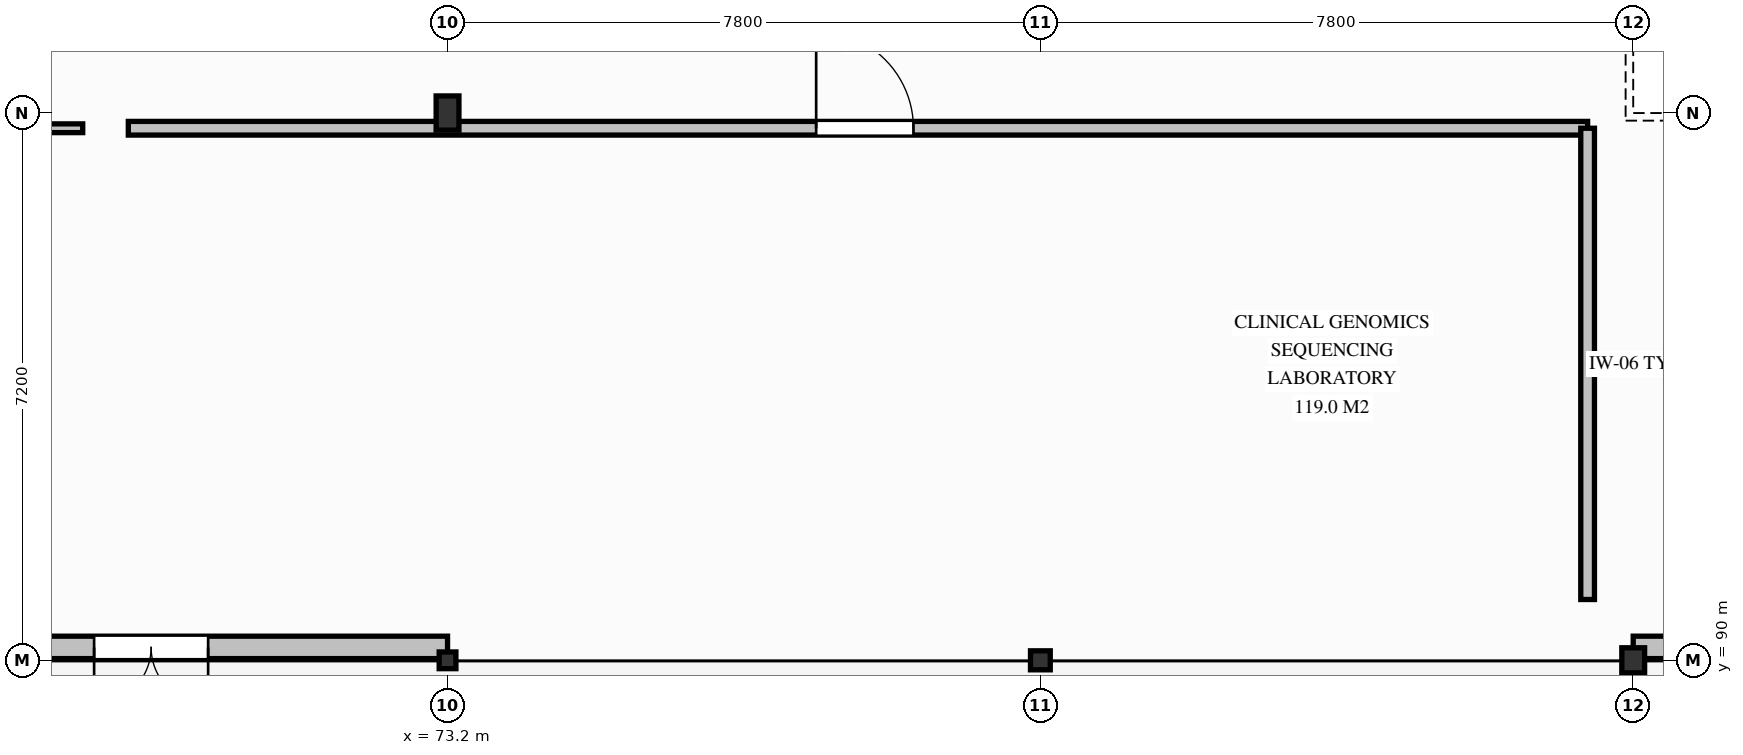
"""IFC4 building model, lengths in metres.
Left out: names, types, materials, properties, quantities, classifications, styles, units other than length and angle.
Written with IfcOpenShell. Run it as: python <this file> out.ifc"""

import sys

from ifc_helpers import new_model, si_unit, direction, frame, frame_2d, origin, origin_2d, place, context, subcontext, project, spatial, rectangle, hollow_rectangle, i_section, extrude, element, fill, save


model = new_model("IFC4")
c1 = context("Model", 3, precision=1e-05, world=origin(), true_north=direction((0.0, 1.0)))
c2 = subcontext(c1, "Body", "Model", "MODEL_VIEW")
j1 = project(units=[si_unit("LENGTHUNIT", "METRE"), si_unit("PLANEANGLEUNIT", "RADIAN")], contexts=[c1])
p1 = place(None, origin())
s1 = spatial("IfcSite", under=j1, at=p1, CompositionType="ELEMENT")
p2 = place(p1, origin())
s2 = spatial("IfcBuilding", under=s1, at=p2, CompositionType="ELEMENT")
p3 = place(p2, frame((0.0, 0.0, 17.25)))
s3 = spatial("IfcBuildingStorey", under=s2, at=p3, CompositionType="ELEMENT", Elevation=17.25)
p4 = place(p3, frame((73.2, 90.0, 0.0), z_axis=(0.0, 0.0, 1.0), x_axis=(1.0, 0.0, 0.0)))
e1 = element("IfcColumn", 1, at=p4, inside=s3, PredefinedType="COLUMN", context=c2, shape_type="SweptSolid", body=[
    extrude(hollow_rectangle(XDim=0.22, YDim=0.22, WallThickness=0.012, InnerFilletRadius=0.019, OuterFilletRadius=0.031, at=origin_2d()), origin(), (0.0, 0.0, 1.0), 4.05),
])
p5 = place(p3, frame((73.2, 97.2, 0.0), z_axis=(0.0, 0.0, 1.0), x_axis=(1.0, 0.0, 0.0)))
e2 = element("IfcColumn", 2, at=p5, inside=s3, PredefinedType="COLUMN", context=c2, shape_type="SweptSolid", body=[
    extrude(i_section(OverallWidth=0.3, OverallDepth=0.45, WebThickness=0.014, FlangeThickness=0.026, FilletRadius=0.027, at=origin_2d()), origin(), (0.0, 0.0, 1.0), 4.05),
])
p6 = place(p3, frame((81.0, 90.0, 0.0), z_axis=(0.0, 0.0, 1.0), x_axis=(1.0, 0.0, 0.0)))
e3 = element("IfcColumn", 3, at=p6, inside=s3, PredefinedType="COLUMN", context=c2, shape_type="SweptSolid", body=[
    extrude(i_section(OverallWidth=0.26, OverallDepth=0.25, WebThickness=0.008, FlangeThickness=0.012, FilletRadius=0.024, at=origin_2d()), origin(), (0.0, 0.0, 1.0), 4.05),
])
p7 = place(p3, frame((88.8, 90.0, 0.0), z_axis=(0.0, 0.0, 1.0), x_axis=(1.0, 0.0, 0.0)))
e4 = element("IfcColumn", 4, at=p7, inside=s3, PredefinedType="COLUMN", context=c2, shape_type="SweptSolid", body=[
    extrude(i_section(OverallWidth=0.3, OverallDepth=0.33, WebThickness=0.01, FlangeThickness=0.017, FilletRadius=0.027, at=origin_2d()), origin(), (0.0, 0.0, 1.0), 4.05),
])
p8 = place(p3, frame((96.6, 90.17, 0.0), z_axis=(0.0, 0.0, 1.0), x_axis=(-1.0, 0.0, 0.0)))
e5 = element("IfcWall", 5, at=p8, inside=s3, PredefinedType="SOLIDWALL", context=c2, shape_type="SweptSolid", body=[
    extrude(rectangle(XDim=7.8, YDim=0.295, at=frame_2d((3.9, 0.0))), origin(), (0.0, 0.0, 1.0), 3.268),
])
p9 = place(p8, frame((2.75, 0.0, 0.85)))
e6 = element("IfcOpeningElement", 6, at=p9, cuts=e5, PredefinedType="OPENING", context=c2, shape_type="SweptSolid", body=[
    extrude(rectangle(XDim=2.3, YDim=1.9, at=frame_2d((1.15, 0.95))), frame((0.0, 0.157, 0.0), z_axis=(0.0, -1.0, 0.0), x_axis=(1.0, 0.0, 0.0)), (0.0, 0.0, 1.0), 0.315),
])
p10 = place(p3, frame((73.2, 90.17, 0.0), z_axis=(0.0, 0.0, 1.0), x_axis=(-1.0, 0.0, 0.0)))
e7 = element("IfcWall", 7, at=p10, inside=s3, PredefinedType="SOLIDWALL", context=c2, shape_type="SweptSolid", body=[
    extrude(rectangle(XDim=7.8, YDim=0.295, at=frame_2d((3.9, 0.0))), origin(), (0.0, 0.0, 1.0), 3.318),
])
p11 = place(p10, frame((3.15, 0.0, 0.0)))
e8 = element("IfcOpeningElement", 8, at=p11, cuts=e7, PredefinedType="OPENING", context=c2, shape_type="SweptSolid", body=[
    extrude(rectangle(XDim=1.5, YDim=2.25, at=frame_2d((0.75, 1.125))), frame((0.0, 0.157, 0.0), z_axis=(0.0, -1.0, 0.0), x_axis=(1.0, 0.0, 0.0)), (0.0, 0.0, 1.0), 0.315),
])
p12 = place(p3, frame((49.52, 97.0, 0.0), z_axis=(0.0, 0.0, 1.0), x_axis=(1.0, 0.0, 0.0)))
e9 = element("IfcWall", 9, at=p12, inside=s3, PredefinedType="PARTITIONING", context=c2, shape_type="SweptSolid", body=[
    extrude(rectangle(XDim=18.88, YDim=0.115, at=frame_2d((9.44, 0.0))), origin(), (0.0, 0.0, 1.0), 3.218),
])
p13 = place(p12, frame((9.13, 0.0, 0.0)))
e10 = element("IfcOpeningElement", 10, at=p13, cuts=e9, PredefinedType="OPENING", context=c2, shape_type="SweptSolid", body=[
    extrude(rectangle(XDim=1.24, YDim=2.2, at=frame_2d((0.62, 1.1))), frame((0.0, 0.067, 0.0), z_axis=(0.0, -1.0, 0.0), x_axis=(1.0, 0.0, 0.0)), (0.0, 0.0, 1.0), 0.135),
])
p14 = place(p3, frame((69.0, 97.0, 0.0), z_axis=(0.0, 0.0, 1.0), x_axis=(1.0, 0.0, 0.0)))
e11 = element("IfcWall", 11, at=p14, inside=s3, PredefinedType="PARTITIONING", context=c2, shape_type="SweptSolid", body=[
    extrude(rectangle(XDim=19.2, YDim=0.18, at=frame_2d((9.6, 0.0))), origin(), (0.0, 0.0, 1.0), 3.318),
])
p15 = place(p14, frame((9.05, 0.0, 0.0)))
e12 = element("IfcOpeningElement", 12, at=p15, cuts=e11, PredefinedType="OPENING", context=c2, shape_type="SweptSolid", body=[
    extrude(rectangle(XDim=1.28, YDim=2.22, at=frame_2d((0.64, 1.11))), frame((0.0, 0.1, 0.0), z_axis=(0.0, -1.0, 0.0), x_axis=(1.0, 0.0, 0.0)), (0.0, 0.0, 1.0), 0.2),
])
p16 = place(p3, frame((88.2, 97.0, 0.0), z_axis=(0.0, 0.0, 1.0), x_axis=(0.0, -1.0, 0.0)))
e13 = element("IfcWall", 13, at=p16, inside=s3, PredefinedType="PARTITIONING", context=c2, shape_type="SweptSolid", body=[
    extrude(rectangle(XDim=6.2, YDim=0.18, at=frame_2d((3.1, 0.0))), origin(), (0.0, 0.0, 1.0), 3.78),
])
p17 = place(p11, origin())
e14 = element("IfcDoor", 14, at=p17, inside=s3, OperationType="DOUBLE_DOOR_SINGLE_SWING", PredefinedType="DOOR", context=c2, shape_type="SweptSolid", body=[
    extrude(rectangle(XDim=1.5, YDim=2.25, at=frame_2d((0.75, 1.125))), frame((0.0, 0.025, 0.0), z_axis=(0.0, -1.0, 0.0), x_axis=(1.0, 0.0, 0.0)), (0.0, 0.0, 1.0), 0.05),
])
fill(e8, e14)
p18 = place(p15, origin())
e15 = element("IfcDoor", 15, at=p18, inside=s3, OperationType="SINGLE_SWING_LEFT", PredefinedType="DOOR", context=c2, shape_type="SweptSolid", body=[
    extrude(rectangle(XDim=1.28, YDim=2.22, at=frame_2d((0.64, 1.11))), frame((0.0, 0.025, 0.0), z_axis=(0.0, -1.0, 0.0), x_axis=(1.0, 0.0, 0.0)), (0.0, 0.0, 1.0), 0.05),
])
fill(e12, e15)
save(model, sys.argv[1])
